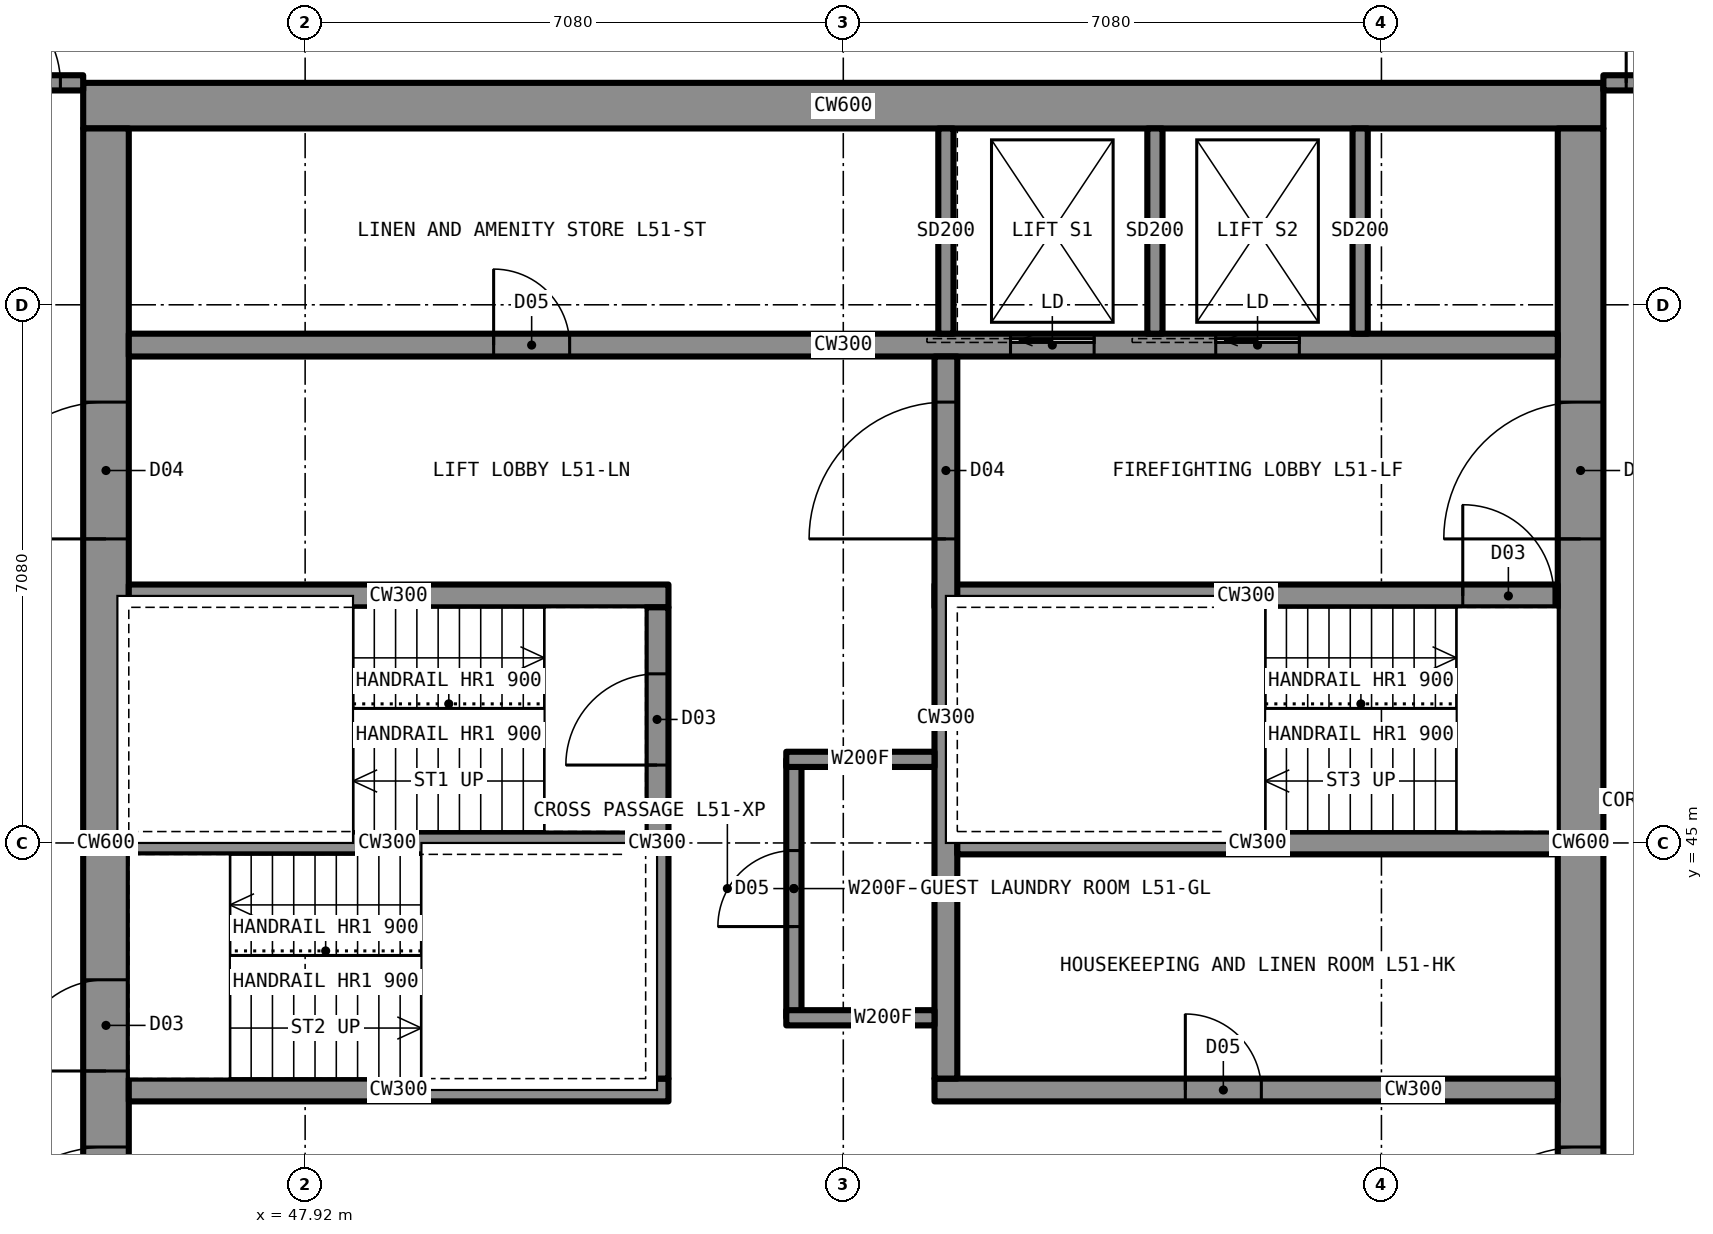
"""IFC4 building model, lengths in metres.
Left out: names, types, materials, properties, quantities, classifications, styles, units other than length and angle.
Written with IfcOpenShell. Run it as: python <this file> out.ifc"""

import sys

from ifc_helpers import new_model, si_unit, direction, frame, frame_2d, origin, place, context, subcontext, project, spatial, rectangle, extrude, element, fill, save


model = new_model("IFC4")
c1 = context("Model", 3, precision=1e-05, world=origin(), true_north=direction((0.0, 1.0)))
c2 = subcontext(c1, "Body", "Model", "MODEL_VIEW")
j1 = project(units=[si_unit("LENGTHUNIT", "METRE"), si_unit("PLANEANGLEUNIT", "RADIAN")], contexts=[c1])
p1 = place(None, origin())
s1 = spatial("IfcSite", under=j1, at=p1, CompositionType="ELEMENT")
p2 = place(p1, origin())
s2 = spatial("IfcBuilding", under=s1, at=p2, CompositionType="ELEMENT")
p3 = place(p2, frame((0.0, 0.0, 182.8)))
s3 = spatial("IfcBuildingStorey", under=s2, at=p3, CompositionType="ELEMENT", Elevation=182.8)
p4 = place(p3, frame((45.0, 54.7, 0.0), z_axis=(0.0, 0.0, 1.0), x_axis=(1.0, 0.0, 0.0)))
e1 = element("IfcWall", 1, at=p4, inside=s3, PredefinedType="SHEAR", context=c2, shape_type="SweptSolid", body=[
    extrude(rectangle(XDim=20.0, YDim=0.6, at=frame_2d((10.0, 0.0))), origin(), (0.0, 0.0, 1.0), 3.5),
])
p5 = place(p3, frame((64.7, 35.6, 0.0), z_axis=(0.0, 0.0, 1.0), x_axis=(0.0, 1.0, 0.0)))
e2 = element("IfcWall", 2, at=p5, inside=s3, PredefinedType="SHEAR", context=c2, shape_type="SweptSolid", body=[
    extrude(rectangle(XDim=18.8, YDim=0.6, at=frame_2d((9.4, 0.0))), origin(), (0.0, 0.0, 1.0), 3.5),
])
p6 = place(p5, frame((13.4, 0.0, 0.0)))
e3 = element("IfcOpeningElement", 3, at=p6, cuts=e2, PredefinedType="OPENING", context=c2, shape_type="SweptSolid", body=[
    extrude(rectangle(XDim=1.8, YDim=2.2, at=frame_2d((0.9, 1.1))), frame((0.0, 0.31, 0.0), z_axis=(0.0, -1.0, 0.0), x_axis=(1.0, 0.0, 0.0)), (0.0, 0.0, 1.0), 0.62),
])
p7 = place(p5, frame((3.6, 0.0, 0.0)))
e4 = element("IfcOpeningElement", 4, at=p7, cuts=e2, PredefinedType="OPENING", context=c2, shape_type="SweptSolid", body=[
    extrude(rectangle(XDim=1.8, YDim=2.2, at=frame_2d((0.9, 1.1))), frame((0.0, 0.31, 0.0), z_axis=(0.0, -1.0, 0.0), x_axis=(1.0, 0.0, 0.0)), (0.0, 0.0, 1.0), 0.62),
])
p8 = place(p3, frame((45.3, 35.6, 0.0), z_axis=(0.0, 0.0, 1.0), x_axis=(0.0, 1.0, 0.0)))
e5 = element("IfcWall", 5, at=p8, inside=s3, PredefinedType="SHEAR", context=c2, shape_type="SweptSolid", body=[
    extrude(rectangle(XDim=18.8, YDim=0.6, at=frame_2d((9.4, 0.0))), origin(), (0.0, 0.0, 1.0), 3.5),
])
p9 = place(p8, frame((13.4, 0.0, 0.0)))
e6 = element("IfcOpeningElement", 6, at=p9, cuts=e5, PredefinedType="OPENING", context=c2, shape_type="SweptSolid", body=[
    extrude(rectangle(XDim=1.8, YDim=2.2, at=frame_2d((0.9, 1.1))), frame((0.0, 0.31, 0.0), z_axis=(0.0, -1.0, 0.0), x_axis=(1.0, 0.0, 0.0)), (0.0, 0.0, 1.0), 0.62),
])
p10 = place(p8, frame((3.6, 0.0, 0.0)))
e7 = element("IfcOpeningElement", 7, at=p10, cuts=e5, PredefinedType="OPENING", context=c2, shape_type="SweptSolid", body=[
    extrude(rectangle(XDim=1.8, YDim=2.2, at=frame_2d((0.9, 1.1))), frame((0.0, 0.31, 0.0), z_axis=(0.0, -1.0, 0.0), x_axis=(1.0, 0.0, 0.0)), (0.0, 0.0, 1.0), 0.62),
])
p11 = place(p8, frame((6.4, 0.0, 0.0)))
e8 = element("IfcOpeningElement", 8, at=p11, cuts=e5, PredefinedType="OPENING", context=c2, shape_type="SweptSolid", body=[
    extrude(rectangle(XDim=1.2, YDim=2.2, at=frame_2d((0.6, 1.1))), frame((0.0, 0.31, 0.0), z_axis=(0.0, -1.0, 0.0), x_axis=(1.0, 0.0, 0.0)), (0.0, 0.0, 1.0), 0.62),
])
p12 = place(p3, frame((45.6, 51.55, 0.0), z_axis=(0.0, 0.0, 1.0), x_axis=(1.0, 0.0, 0.0)))
e9 = element("IfcWall", 9, at=p12, inside=s3, PredefinedType="SHEAR", context=c2, shape_type="SweptSolid", body=[
    extrude(rectangle(XDim=18.8, YDim=0.3, at=frame_2d((9.4, 0.0))), origin(), (0.0, 0.0, 1.0), 3.5),
])
p13 = place(p12, frame((4.8, 0.0, 0.0)))
e10 = element("IfcOpeningElement", 10, at=p13, cuts=e9, PredefinedType="OPENING", context=c2, shape_type="SweptSolid", body=[
    extrude(rectangle(XDim=1.0, YDim=2.1, at=frame_2d((0.5, 1.05))), frame((0.0, 0.16, 0.0), z_axis=(0.0, -1.0, 0.0), x_axis=(1.0, 0.0, 0.0)), (0.0, 0.0, 1.0), 0.32),
])
p14 = place(p12, frame((11.6, 0.0, 0.0)))
e11 = element("IfcOpeningElement", 11, at=p14, cuts=e9, PredefinedType="OPENING", context=c2, shape_type="SweptSolid", body=[
    extrude(rectangle(XDim=1.1, YDim=2.2, at=frame_2d((0.55, 1.1))), frame((0.0, 0.16, 0.0), z_axis=(0.0, -1.0, 0.0), x_axis=(1.0, 0.0, 0.0)), (0.0, 0.0, 1.0), 0.32),
])
p15 = place(p12, frame((14.3, 0.0, 0.0)))
e12 = element("IfcOpeningElement", 12, at=p15, cuts=e9, PredefinedType="OPENING", context=c2, shape_type="SweptSolid", body=[
    extrude(rectangle(XDim=1.1, YDim=2.2, at=frame_2d((0.55, 1.1))), frame((0.0, 0.16, 0.0), z_axis=(0.0, -1.0, 0.0), x_axis=(1.0, 0.0, 0.0)), (0.0, 0.0, 1.0), 0.32),
])
p16 = place(p3, frame((45.6, 48.25, 0.0), z_axis=(0.0, 0.0, 1.0), x_axis=(1.0, 0.0, 0.0)))
e13 = element("IfcWall", 13, at=p16, inside=s3, PredefinedType="SHEAR", context=c2, shape_type="SweptSolid", body=[
    extrude(rectangle(XDim=7.1, YDim=0.3, at=frame_2d((3.55, 0.0))), origin(), (0.0, 0.0, 1.0), 3.5),
])
p17 = place(p3, frame((56.2, 48.25, 0.0), z_axis=(0.0, 0.0, 1.0), x_axis=(1.0, 0.0, 0.0)))
e14 = element("IfcWall", 14, at=p17, inside=s3, PredefinedType="SHEAR", context=c2, shape_type="SweptSolid", body=[
    extrude(rectangle(XDim=8.2, YDim=0.3, at=frame_2d((4.1, 0.0))), origin(), (0.0, 0.0, 1.0), 3.5),
])
p18 = place(p17, frame((6.95, 0.0, 0.0)))
e15 = element("IfcOpeningElement", 15, at=p18, cuts=e14, PredefinedType="OPENING", context=c2, shape_type="SweptSolid", body=[
    extrude(rectangle(XDim=1.2, YDim=2.2, at=frame_2d((0.6, 1.1))), frame((0.0, 0.16, 0.0), z_axis=(0.0, -1.0, 0.0), x_axis=(1.0, 0.0, 0.0)), (0.0, 0.0, 1.0), 0.32),
])
p19 = place(p3, frame((45.6, 41.75, 0.0), z_axis=(0.0, 0.0, 1.0), x_axis=(1.0, 0.0, 0.0)))
e16 = element("IfcWall", 16, at=p19, inside=s3, PredefinedType="SHEAR", context=c2, shape_type="SweptSolid", body=[
    extrude(rectangle(XDim=7.1, YDim=0.3, at=frame_2d((3.55, 0.0))), origin(), (0.0, 0.0, 1.0), 3.5),
])
p20 = place(p3, frame((56.2, 41.75, 0.0), z_axis=(0.0, 0.0, 1.0), x_axis=(1.0, 0.0, 0.0)))
e17 = element("IfcWall", 17, at=p20, inside=s3, PredefinedType="SHEAR", context=c2, shape_type="SweptSolid", body=[
    extrude(rectangle(XDim=8.2, YDim=0.3, at=frame_2d((4.1, 0.0))), origin(), (0.0, 0.0, 1.0), 3.5),
])
p21 = place(p20, frame((3.3, 0.0, 0.0)))
e18 = element("IfcOpeningElement", 18, at=p21, cuts=e17, PredefinedType="OPENING", context=c2, shape_type="SweptSolid", body=[
    extrude(rectangle(XDim=1.0, YDim=2.1, at=frame_2d((0.5, 1.05))), frame((0.0, 0.16, 0.0), z_axis=(0.0, -1.0, 0.0), x_axis=(1.0, 0.0, 0.0)), (0.0, 0.0, 1.0), 0.32),
])
p22 = place(p3, frame((52.55, 41.9, 0.0), z_axis=(0.0, 0.0, 1.0), x_axis=(0.0, 1.0, 0.0)))
e19 = element("IfcWall", 19, at=p22, inside=s3, PredefinedType="SHEAR", context=c2, shape_type="SweptSolid", body=[
    extrude(rectangle(XDim=6.2, YDim=0.3, at=frame_2d((3.1, 0.0))), origin(), (0.0, 0.0, 1.0), 3.5),
])
p23 = place(p22, frame((4.125, 0.0, 0.0)))
e20 = element("IfcOpeningElement", 20, at=p23, cuts=e19, PredefinedType="OPENING", context=c2, shape_type="SweptSolid", body=[
    extrude(rectangle(XDim=1.2, YDim=2.2, at=frame_2d((0.6, 1.1))), frame((0.0, 0.16, 0.0), z_axis=(0.0, -1.0, 0.0), x_axis=(1.0, 0.0, 0.0)), (0.0, 0.0, 1.0), 0.32),
])
p24 = place(p3, frame((56.35, 41.9, 0.0), z_axis=(0.0, 0.0, 1.0), x_axis=(0.0, 1.0, 0.0)))
e21 = element("IfcWall", 21, at=p24, inside=s3, PredefinedType="SHEAR", context=c2, shape_type="SweptSolid", body=[
    extrude(rectangle(XDim=9.5, YDim=0.3, at=frame_2d((4.75, 0.0))), origin(), (0.0, 0.0, 1.0), 3.5),
])
p25 = place(p24, frame((7.1, 0.0, 0.0)))
e22 = element("IfcOpeningElement", 22, at=p25, cuts=e21, PredefinedType="OPENING", context=c2, shape_type="SweptSolid", body=[
    extrude(rectangle(XDim=1.8, YDim=2.2, at=frame_2d((0.9, 1.1))), frame((0.0, 0.16, 0.0), z_axis=(0.0, -1.0, 0.0), x_axis=(1.0, 0.0, 0.0)), (0.0, 0.0, 1.0), 0.32),
])
p26 = place(p3, frame((45.6, 45.0, 0.0), z_axis=(0.0, 0.0, 1.0), x_axis=(1.0, 0.0, 0.0)))
e23 = element("IfcWall", 23, at=p26, inside=s3, PredefinedType="SHEAR", context=c2, shape_type="SweptSolid", body=[
    extrude(rectangle(XDim=6.8, YDim=0.3, at=frame_2d((3.4, 0.0))), origin(), (0.0, 0.0, 1.0), 3.5),
])
p27 = place(p3, frame((56.5, 45.0, 0.0), z_axis=(0.0, 0.0, 1.0), x_axis=(1.0, 0.0, 0.0)))
e24 = element("IfcWall", 24, at=p27, inside=s3, PredefinedType="SHEAR", context=c2, shape_type="SweptSolid", body=[
    extrude(rectangle(XDim=7.9, YDim=0.3, at=frame_2d((3.95, 0.0))), origin(), (0.0, 0.0, 1.0), 3.5),
])
p28 = place(p3, frame((43.2, 55.0, 0.0), z_axis=(0.0, 0.0, 1.0), x_axis=(1.0, 0.0, 0.0)))
e25 = element("IfcWall", 25, at=p28, inside=s3, PredefinedType="PARTITIONING", context=c2, shape_type="SweptSolid", body=[
    extrude(rectangle(XDim=1.8, YDim=0.2, at=frame_2d((0.9, 0.0))), origin(), (0.0, 0.0, 1.0), 3.33),
])
p29 = place(p28, frame((0.3, 0.0, 0.0)))
e26 = element("IfcOpeningElement", 26, at=p29, cuts=e25, PredefinedType="OPENING", context=c2, shape_type="SweptSolid", body=[
    extrude(rectangle(XDim=1.2, YDim=2.2, at=frame_2d((0.6, 1.1))), frame((0.0, 0.11, 0.0), z_axis=(0.0, -1.0, 0.0), x_axis=(1.0, 0.0, 0.0)), (0.0, 0.0, 1.0), 0.22),
])
p30 = place(p3, frame((65.0, 55.0, 0.0), z_axis=(0.0, 0.0, 1.0), x_axis=(1.0, 0.0, 0.0)))
e27 = element("IfcWall", 27, at=p30, inside=s3, PredefinedType="PARTITIONING", context=c2, shape_type="SweptSolid", body=[
    extrude(rectangle(XDim=1.8, YDim=0.2, at=frame_2d((0.9, 0.0))), origin(), (0.0, 0.0, 1.0), 3.33),
])
p31 = place(p30, frame((0.3, 0.0, 0.0)))
e28 = element("IfcOpeningElement", 28, at=p31, cuts=e27, PredefinedType="OPENING", context=c2, shape_type="SweptSolid", body=[
    extrude(rectangle(XDim=1.2, YDim=2.2, at=frame_2d((0.6, 1.1))), frame((0.0, 0.11, 0.0), z_axis=(0.0, -1.0, 0.0), x_axis=(1.0, 0.0, 0.0)), (0.0, 0.0, 1.0), 0.22),
])
p32 = place(p3, frame((54.35, 42.0, 0.0), z_axis=(0.0, 0.0, 1.0), x_axis=(0.0, 1.0, 0.0)))
e29 = element("IfcWall", 29, at=p32, inside=s3, PredefinedType="PARTITIONING", context=c2, shape_type="SweptSolid", body=[
    extrude(rectangle(XDim=1.7, YDim=0.2, at=frame_2d((0.85, 0.0))), origin(), (0.0, 0.0, 1.0), 3.33),
])
p33 = place(p32, frame((0.35, 0.0, 0.0)))
e30 = element("IfcOpeningElement", 30, at=p33, cuts=e29, PredefinedType="OPENING", context=c2, shape_type="SweptSolid", body=[
    extrude(rectangle(XDim=1.0, YDim=2.1, at=frame_2d((0.5, 1.05))), frame((0.0, 0.11, 0.0), z_axis=(0.0, -1.0, 0.0), x_axis=(1.0, 0.0, 0.0)), (0.0, 0.0, 1.0), 0.22),
])
for number, where, z_axis, x_axis in (
    (31, (54.25, 42.0, 0.0), (0.0, 0.0, 1.0), (1.0, 0.0, 0.0)),
    (32, (54.25, 43.7, 0.0), (0.0, 0.0, 1.0), (1.0, 0.0, 0.0)),
):
    element("IfcWall", number, at=place(p3, frame(where, z_axis=z_axis, x_axis=x_axis)), inside=s3, PredefinedType="PARTITIONING", context=c2, shape_type="SweptSolid", body=[
        extrude(rectangle(XDim=1.95, YDim=0.2, at=frame_2d((0.975, 0.0))), origin(), (0.0, 0.0, 1.0), 3.33),
    ])
p34 = place(p3, frame((54.35, 44.1, 0.0), z_axis=(0.0, 0.0, 1.0), x_axis=(0.0, 1.0, 0.0)))
e33 = element("IfcWall", 33, at=p34, inside=s3, PredefinedType="PARTITIONING", context=c2, shape_type="SweptSolid", body=[
    extrude(rectangle(XDim=3.9, YDim=0.2, at=frame_2d((1.95, 0.0))), origin(), (0.0, 0.0, 1.0), 3.33),
])
p35 = place(p34, frame((1.45, 0.0, 0.0)))
e34 = element("IfcOpeningElement", 34, at=p35, cuts=e33, PredefinedType="OPENING", context=c2, shape_type="SweptSolid", body=[
    extrude(rectangle(XDim=1.0, YDim=2.1, at=frame_2d((0.5, 1.05))), frame((0.0, 0.11, 0.0), z_axis=(0.0, -1.0, 0.0), x_axis=(1.0, 0.0, 0.0)), (0.0, 0.0, 1.0), 0.22),
])
for number, where, z_axis, x_axis in (
    (35, (54.25, 44.1, 0.0), (0.0, 0.0, 1.0), (1.0, 0.0, 0.0)),
    (36, (54.25, 48.0, 0.0), (0.0, 0.0, 1.0), (1.0, 0.0, 0.0)),
):
    element("IfcWall", number, at=place(p3, frame(where, z_axis=z_axis, x_axis=x_axis)), inside=s3, PredefinedType="PARTITIONING", context=c2, shape_type="SweptSolid", body=[
        extrude(rectangle(XDim=1.95, YDim=0.2, at=frame_2d((0.975, 0.0))), origin(), (0.0, 0.0, 1.0), 3.33),
    ])
for number, where, z_axis, x_axis in (
    (37, (59.1, 51.7, 0.0), (0.0, 0.0, 1.0), (0.0, 1.0, 0.0)),
    (38, (61.8, 51.7, 0.0), (0.0, 0.0, 1.0), (0.0, 1.0, 0.0)),
    (39, (56.35, 51.7, 0.0), (0.0, 0.0, 1.0), (0.0, 1.0, 0.0)),
):
    element("IfcWall", number, at=place(p3, frame(where, z_axis=z_axis, x_axis=x_axis)), inside=s3, PredefinedType="PARTITIONING", context=c2, shape_type="SweptSolid", body=[
        extrude(rectangle(XDim=2.7, YDim=0.2, at=frame_2d((1.35, 0.0))), origin(), (0.0, 0.0, 1.0), 3.33),
    ])
p36 = place(p29, origin())
e40 = element("IfcDoor", 40, at=p36, inside=s3, OperationType="SINGLE_SWING_LEFT", PredefinedType="DOOR", context=c2, shape_type="SweptSolid", body=[
    extrude(rectangle(XDim=1.2, YDim=2.2, at=frame_2d((0.6, 1.1))), frame((0.0, 0.025, 0.0), z_axis=(0.0, -1.0, 0.0), x_axis=(1.0, 0.0, 0.0)), (0.0, 0.0, 1.0), 0.05),
])
fill(e26, e40)
p37 = place(p31, origin())
e41 = element("IfcDoor", 41, at=p37, inside=s3, OperationType="SINGLE_SWING_LEFT", PredefinedType="DOOR", context=c2, shape_type="SweptSolid", body=[
    extrude(rectangle(XDim=1.2, YDim=2.2, at=frame_2d((0.6, 1.1))), frame((0.0, 0.025, 0.0), z_axis=(0.0, -1.0, 0.0), x_axis=(1.0, 0.0, 0.0)), (0.0, 0.0, 1.0), 0.05),
])
fill(e28, e41)
p38 = place(p33, origin())
e42 = element("IfcDoor", 42, at=p38, inside=s3, OperationType="SINGLE_SWING_LEFT", PredefinedType="DOOR", context=c2, shape_type="SweptSolid", body=[
    extrude(rectangle(XDim=1.0, YDim=2.1, at=frame_2d((0.5, 1.05))), frame((0.0, 0.025, 0.0), z_axis=(0.0, -1.0, 0.0), x_axis=(1.0, 0.0, 0.0)), (0.0, 0.0, 1.0), 0.05),
])
fill(e30, e42)
p39 = place(p35, origin())
e43 = element("IfcDoor", 43, at=p39, inside=s3, OperationType="SINGLE_SWING_LEFT", PredefinedType="DOOR", context=c2, shape_type="SweptSolid", body=[
    extrude(rectangle(XDim=1.0, YDim=2.1, at=frame_2d((0.5, 1.05))), frame((0.0, 0.025, 0.0), z_axis=(0.0, -1.0, 0.0), x_axis=(1.0, 0.0, 0.0)), (0.0, 0.0, 1.0), 0.05),
])
fill(e34, e43)
p40 = place(p9, origin())
e44 = element("IfcDoor", 44, at=p40, inside=s3, OperationType="DOUBLE_DOOR_SINGLE_SWING", PredefinedType="DOOR", context=c2, shape_type="SweptSolid", body=[
    extrude(rectangle(XDim=1.8, YDim=2.2, at=frame_2d((0.9, 1.1))), frame((0.0, 0.025, 0.0), z_axis=(0.0, -1.0, 0.0), x_axis=(1.0, 0.0, 0.0)), (0.0, 0.0, 1.0), 0.05),
])
fill(e6, e44)
p41 = place(p10, origin())
e45 = element("IfcDoor", 45, at=p41, inside=s3, OperationType="DOUBLE_DOOR_SINGLE_SWING", PredefinedType="DOOR", context=c2, shape_type="SweptSolid", body=[
    extrude(rectangle(XDim=1.8, YDim=2.2, at=frame_2d((0.9, 1.1))), frame((0.0, 0.025, 0.0), z_axis=(0.0, -1.0, 0.0), x_axis=(1.0, 0.0, 0.0)), (0.0, 0.0, 1.0), 0.05),
])
fill(e7, e45)
p42 = place(p6, origin())
e46 = element("IfcDoor", 46, at=p42, inside=s3, OperationType="DOUBLE_DOOR_SINGLE_SWING", PredefinedType="DOOR", context=c2, shape_type="SweptSolid", body=[
    extrude(rectangle(XDim=1.8, YDim=2.2, at=frame_2d((0.9, 1.1))), frame((0.0, 0.025, 0.0), z_axis=(0.0, -1.0, 0.0), x_axis=(1.0, 0.0, 0.0)), (0.0, 0.0, 1.0), 0.05),
])
fill(e3, e46)
p43 = place(p7, origin())
e47 = element("IfcDoor", 47, at=p43, inside=s3, OperationType="DOUBLE_DOOR_SINGLE_SWING", PredefinedType="DOOR", context=c2, shape_type="SweptSolid", body=[
    extrude(rectangle(XDim=1.8, YDim=2.2, at=frame_2d((0.9, 1.1))), frame((0.0, 0.025, 0.0), z_axis=(0.0, -1.0, 0.0), x_axis=(1.0, 0.0, 0.0)), (0.0, 0.0, 1.0), 0.05),
])
fill(e4, e47)
p44 = place(p25, origin())
e48 = element("IfcDoor", 48, at=p44, inside=s3, OperationType="DOUBLE_DOOR_SINGLE_SWING", PredefinedType="DOOR", context=c2, shape_type="SweptSolid", body=[
    extrude(rectangle(XDim=1.8, YDim=2.2, at=frame_2d((0.9, 1.1))), frame((0.0, 0.025, 0.0), z_axis=(0.0, -1.0, 0.0), x_axis=(1.0, 0.0, 0.0)), (0.0, 0.0, 1.0), 0.05),
])
fill(e22, e48)
p45 = place(p23, origin())
e49 = element("IfcDoor", 49, at=p45, inside=s3, OperationType="SINGLE_SWING_LEFT", PredefinedType="DOOR", context=c2, shape_type="SweptSolid", body=[
    extrude(rectangle(XDim=1.2, YDim=2.2, at=frame_2d((0.6, 1.1))), frame((0.0, 0.025, 0.0), z_axis=(0.0, -1.0, 0.0), x_axis=(1.0, 0.0, 0.0)), (0.0, 0.0, 1.0), 0.05),
])
fill(e20, e49)
p46 = place(p11, origin())
e50 = element("IfcDoor", 50, at=p46, inside=s3, OperationType="SINGLE_SWING_LEFT", PredefinedType="DOOR", context=c2, shape_type="SweptSolid", body=[
    extrude(rectangle(XDim=1.2, YDim=2.2, at=frame_2d((0.6, 1.1))), frame((0.0, 0.025, 0.0), z_axis=(0.0, -1.0, 0.0), x_axis=(1.0, 0.0, 0.0)), (0.0, 0.0, 1.0), 0.05),
])
fill(e8, e50)
p47 = place(p18, origin())
e51 = element("IfcDoor", 51, at=p47, inside=s3, OperationType="SINGLE_SWING_LEFT", PredefinedType="DOOR", context=c2, shape_type="SweptSolid", body=[
    extrude(rectangle(XDim=1.2, YDim=2.2, at=frame_2d((0.6, 1.1))), frame((0.0, 0.025, 0.0), z_axis=(0.0, -1.0, 0.0), x_axis=(1.0, 0.0, 0.0)), (0.0, 0.0, 1.0), 0.05),
])
fill(e15, e51)
p48 = place(p21, origin())
e52 = element("IfcDoor", 52, at=p48, inside=s3, OperationType="SINGLE_SWING_LEFT", PredefinedType="DOOR", context=c2, shape_type="SweptSolid", body=[
    extrude(rectangle(XDim=1.0, YDim=2.1, at=frame_2d((0.5, 1.05))), frame((0.0, 0.025, 0.0), z_axis=(0.0, -1.0, 0.0), x_axis=(1.0, 0.0, 0.0)), (0.0, 0.0, 1.0), 0.05),
])
fill(e18, e52)
p49 = place(p13, origin())
e53 = element("IfcDoor", 53, at=p49, inside=s3, OperationType="SINGLE_SWING_LEFT", PredefinedType="DOOR", context=c2, shape_type="SweptSolid", body=[
    extrude(rectangle(XDim=1.0, YDim=2.1, at=frame_2d((0.5, 1.05))), frame((0.0, 0.025, 0.0), z_axis=(0.0, -1.0, 0.0), x_axis=(1.0, 0.0, 0.0)), (0.0, 0.0, 1.0), 0.05),
])
fill(e10, e53)
p50 = place(p14, origin())
e54 = element("IfcDoor", 54, at=p50, inside=s3, OperationType="SLIDING_TO_LEFT", PredefinedType="DOOR", context=c2, shape_type="SweptSolid", body=[
    extrude(rectangle(XDim=1.1, YDim=2.2, at=frame_2d((0.55, 1.1))), frame((0.0, 0.025, 0.0), z_axis=(0.0, -1.0, 0.0), x_axis=(1.0, 0.0, 0.0)), (0.0, 0.0, 1.0), 0.05),
])
fill(e11, e54)
p51 = place(p15, origin())
e55 = element("IfcDoor", 55, at=p51, inside=s3, OperationType="SLIDING_TO_LEFT", PredefinedType="DOOR", context=c2, shape_type="SweptSolid", body=[
    extrude(rectangle(XDim=1.1, YDim=2.2, at=frame_2d((0.55, 1.1))), frame((0.0, 0.025, 0.0), z_axis=(0.0, -1.0, 0.0), x_axis=(1.0, 0.0, 0.0)), (0.0, 0.0, 1.0), 0.05),
])
fill(e12, e55)
save(model, sys.argv[1])
